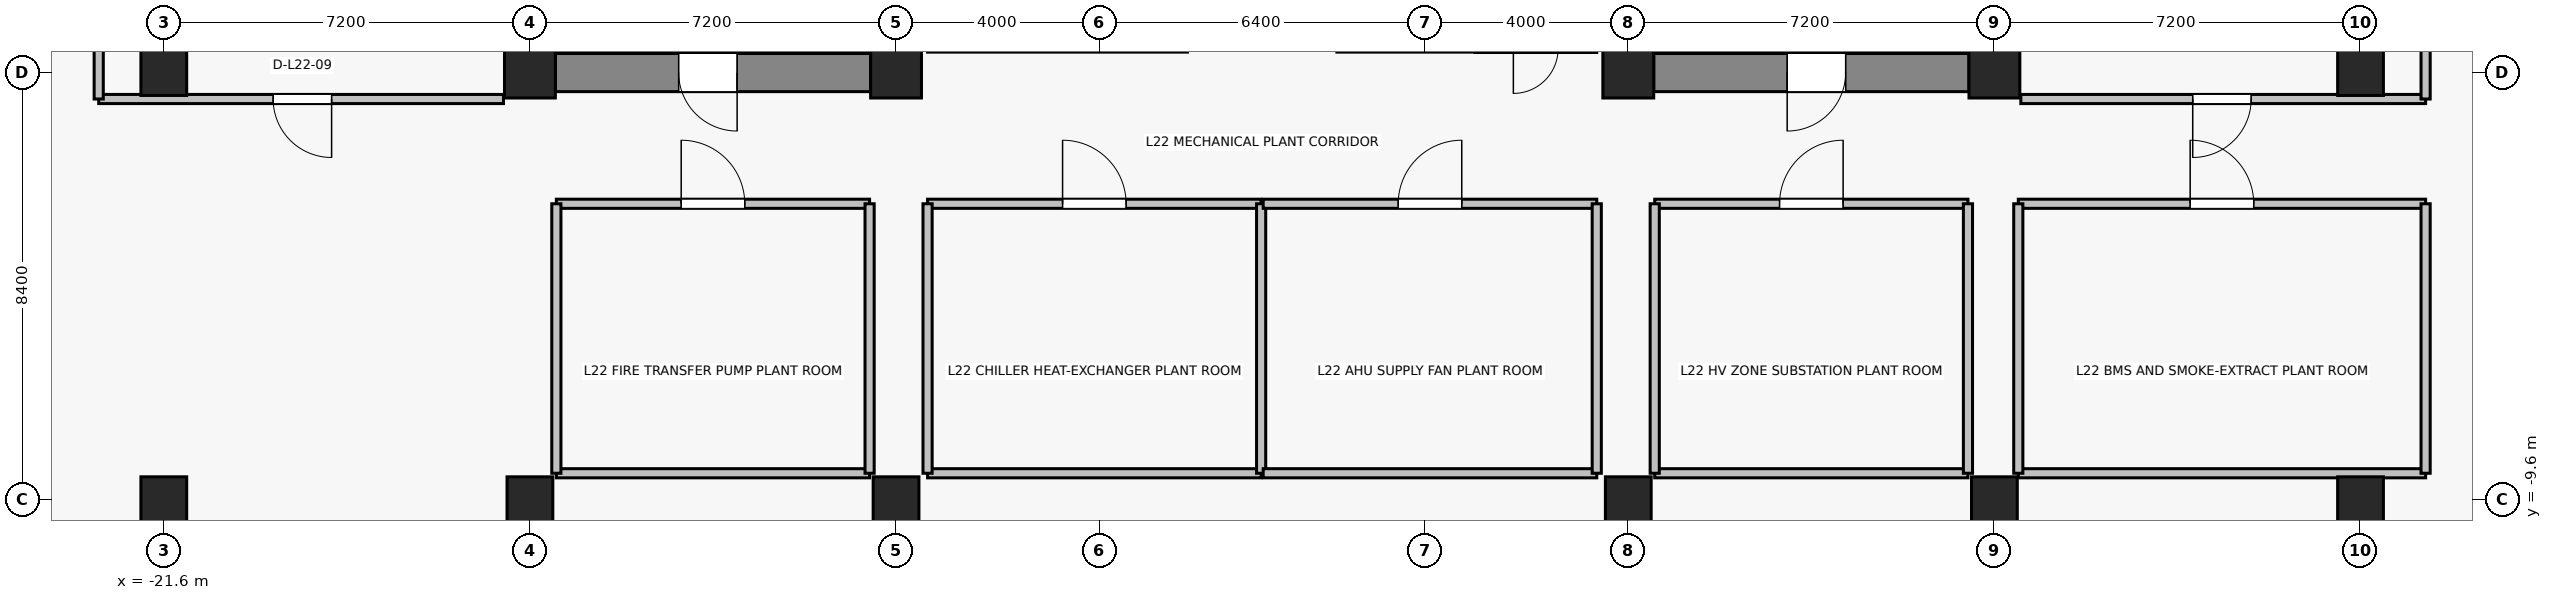
"""IFC4 building model, lengths in metres.
Left out: names, types, materials, properties, quantities, classifications, styles, units other than length and angle.
Written with IfcOpenShell. Run it as: python <this file> out.ifc"""

import sys

from ifc_helpers import new_model, si_unit, direction, frame, frame_2d, origin, origin_2d, place, context, subcontext, project, spatial, rectangle, extrude, source, transform, mapped, element, fill, save


model = new_model("IFC4")
c1 = context("Model", 3, precision=1e-05, world=origin(), true_north=direction((0.0, 1.0)))
c2 = subcontext(c1, "Body", "Model", "MODEL_VIEW")
j1 = project(units=[si_unit("LENGTHUNIT", "METRE"), si_unit("PLANEANGLEUNIT", "RADIAN")], contexts=[c1])
p1 = place(None, origin())
s1 = spatial("IfcSite", under=j1, at=p1, CompositionType="ELEMENT")
p2 = place(p1, origin())
s2 = spatial("IfcBuilding", under=s1, at=p2, CompositionType="ELEMENT")
p3 = place(p2, frame((0.0, 0.0, 80.2)))
s3 = spatial("IfcBuildingStorey", under=s2, at=p3, CompositionType="ELEMENT", Elevation=80.2)
for number, where, z_axis, x_axis in (
    (1, (-14.4, -1.2, 0.0), (0.0, 0.0, 1.0), (1.0, 0.0, 0.0)),
    (2, (-7.2, -1.2, 0.0), (0.0, 0.0, 1.0), (1.0, 0.0, 0.0)),
    (3, (7.2, -1.2, 0.0), (0.0, 0.0, 1.0), (1.0, 0.0, 0.0)),
    (4, (14.4, -1.2, 0.0), (0.0, 0.0, 1.0), (1.0, 0.0, 0.0)),
):
    element("IfcColumn", number, at=place(p3, frame(where, z_axis=z_axis, x_axis=x_axis)), inside=s3, PredefinedType="COLUMN", context=c2, shape_type="SweptSolid", body=[
        extrude(rectangle(XDim=1.0, YDim=1.0, at=origin_2d()), origin(), (0.0, 0.0, 1.0), 6.6),
    ])
for number, where, z_axis, x_axis in (
    (5, (-14.4, -9.6, 0.0), (0.0, 0.0, 1.0), (1.0, 0.0, 0.0)),
    (6, (-7.2, -9.6, 0.0), (0.0, 0.0, 1.0), (1.0, 0.0, 0.0)),
    (7, (7.2, -9.6, 0.0), (0.0, 0.0, 1.0), (1.0, 0.0, 0.0)),
    (8, (14.4, -9.6, 0.0), (0.0, 0.0, 1.0), (1.0, 0.0, 0.0)),
    (9, (-21.6, -9.6, 0.0), (0.0, 0.0, 1.0), (1.0, 0.0, 0.0)),
    (10, (-21.6, -1.2, 0.0), (0.0, 0.0, 1.0), (1.0, 0.0, 0.0)),
    (11, (21.6, -9.6, 0.0), (0.0, 0.0, 1.0), (1.0, 0.0, 0.0)),
    (12, (21.6, -1.2, 0.0), (0.0, 0.0, 1.0), (1.0, 0.0, 0.0)),
):
    element("IfcColumn", number, at=place(p3, frame(where, z_axis=z_axis, x_axis=x_axis)), inside=s3, PredefinedType="COLUMN", context=c2, shape_type="SweptSolid", body=[
        extrude(rectangle(XDim=0.9, YDim=0.9, at=origin_2d()), origin(), (0.0, 0.0, 1.0), 6.6),
    ])
p4 = place(p3, frame((-7.7, -1.2, 0.0), z_axis=(0.0, 0.0, 1.0), x_axis=(-1.0, 0.0, 0.0)))
e13 = element("IfcWall", 13, at=p4, inside=s3, PredefinedType="SHEAR", context=c2, shape_type="SweptSolid", body=[
    extrude(rectangle(XDim=6.2, YDim=0.75, at=frame_2d((3.1, 0.0))), origin(), (0.0, 0.0, 1.0), 6.35),
])
p5 = place(p4, frame((2.625, 0.0, 0.0)))
e14 = element("IfcOpeningElement", 14, at=p5, cuts=e13, PredefinedType="OPENING", context=c2, shape_type="SweptSolid", body=[
    extrude(rectangle(XDim=1.15, YDim=2.15, at=frame_2d((0.575, 1.075))), frame((0.0, 0.385, 0.0), z_axis=(0.0, -1.0, 0.0), x_axis=(1.0, 0.0, 0.0)), (0.0, 0.0, 1.0), 0.77),
])
p6 = place(p3, frame((13.9, -1.2, 0.0), z_axis=(0.0, 0.0, 1.0), x_axis=(-1.0, 0.0, 0.0)))
e15 = element("IfcWall", 15, at=p6, inside=s3, PredefinedType="SHEAR", context=c2, shape_type="SweptSolid", body=[
    extrude(rectangle(XDim=6.2, YDim=0.75, at=frame_2d((3.1, 0.0))), origin(), (0.0, 0.0, 1.0), 6.35),
])
p7 = place(p6, frame((2.425, 0.0, 0.0)))
e16 = element("IfcOpeningElement", 16, at=p7, cuts=e15, PredefinedType="OPENING", context=c2, shape_type="SweptSolid", body=[
    extrude(rectangle(XDim=1.15, YDim=2.15, at=frame_2d((0.575, 1.075))), frame((0.0, 0.385, 0.0), z_axis=(0.0, -1.0, 0.0), x_axis=(1.0, 0.0, 0.0)), (0.0, 0.0, 1.0), 0.77),
])
for number, where, z_axis, x_axis in (
    (17, (-7.4, -0.825, 0.0), (0.0, 0.0, 1.0), (0.0, 1.0, 0.0)),
    (18, (7.4, -0.825, 0.0), (0.0, 0.0, 1.0), (0.0, 1.0, 0.0)),
):
    element("IfcWall", number, at=place(p3, frame(where, z_axis=z_axis, x_axis=x_axis)), inside=s3, PredefinedType="SHEAR", context=c2, shape_type="SweptSolid", body=[
        extrude(rectangle(XDim=4.075, YDim=0.55, at=frame_2d((2.038, 0.0))), origin(), (0.0, 0.0, 1.0), 6.35),
    ])
p8 = place(p3, frame((6.58, -0.73, 0.0), z_axis=(0.0, 0.0, 1.0), x_axis=(-1.0, 0.0, 0.0)))
e19 = element("IfcWall", 19, at=p8, inside=s3, PredefinedType="PARTITIONING", context=c2, shape_type="SweptSolid", body=[
    extrude(rectangle(XDim=2.4, YDim=0.15, at=frame_2d((1.2, 0.0))), origin(), (0.0, 0.0, 1.0), 6.35),
])
p9 = place(p8, frame((0.76, 0.0, 0.0)))
e20 = element("IfcOpeningElement", 20, at=p9, cuts=e19, PredefinedType="OPENING", context=c2, shape_type="SweptSolid", body=[
    extrude(rectangle(XDim=0.88, YDim=2.1, at=frame_2d((0.44, 1.05))), frame((0.0, 0.085, 0.0), z_axis=(0.0, -1.0, 0.0), x_axis=(1.0, 0.0, 0.0)), (0.0, 0.0, 1.0), 0.17),
])
p10 = place(p3, frame((-14.92, -1.72, 0.0), z_axis=(0.0, 0.0, 1.0), x_axis=(-1.0, 0.0, 0.0)))
e21 = element("IfcWall", 21, at=p10, inside=s3, PredefinedType="PARTITIONING", context=c2, shape_type="SweptSolid", body=[
    extrude(rectangle(XDim=7.96, YDim=0.18, at=frame_2d((3.98, 0.0))), origin(), (0.0, 0.0, 1.0), 5.79),
])
p11 = place(p10, frame((3.38, 0.0, 0.0)))
e22 = element("IfcOpeningElement", 22, at=p11, cuts=e21, PredefinedType="OPENING", context=c2, shape_type="SweptSolid", body=[
    extrude(rectangle(XDim=1.15, YDim=2.15, at=frame_2d((0.575, 1.075))), frame((0.0, 0.1, 0.0), z_axis=(0.0, -1.0, 0.0), x_axis=(1.0, 0.0, 0.0)), (0.0, 0.0, 1.0), 0.2),
])
p12 = place(p3, frame((-22.88, -1.72, 0.0), z_axis=(0.0, 0.0, 1.0), x_axis=(0.0, 1.0, 0.0)))
e23 = element("IfcWall", 23, at=p12, inside=s3, PredefinedType="PARTITIONING", context=c2, shape_type="SweptSolid", body=[
    extrude(rectangle(XDim=7.0, YDim=0.18, at=frame_2d((3.5, 0.0))), origin(), (0.0, 0.0, 1.0), 5.332),
])
p13 = place(p3, frame((22.88, -1.72, 0.0), z_axis=(0.0, 0.0, 1.0), x_axis=(-1.0, 0.0, 0.0)))
e24 = element("IfcWall", 24, at=p13, inside=s3, PredefinedType="PARTITIONING", context=c2, shape_type="SweptSolid", body=[
    extrude(rectangle(XDim=7.96, YDim=0.18, at=frame_2d((3.98, 0.0))), origin(), (0.0, 0.0, 1.0), 5.79),
])
p14 = place(p13, frame((3.43, 0.0, 0.0)))
e25 = element("IfcOpeningElement", 25, at=p14, cuts=e24, PredefinedType="OPENING", context=c2, shape_type="SweptSolid", body=[
    extrude(rectangle(XDim=1.15, YDim=2.15, at=frame_2d((0.575, 1.075))), frame((0.0, 0.1, 0.0), z_axis=(0.0, -1.0, 0.0), x_axis=(1.0, 0.0, 0.0)), (0.0, 0.0, 1.0), 0.2),
])
p15 = place(p3, frame((22.88, 5.28, 0.0), z_axis=(0.0, 0.0, 1.0), x_axis=(0.0, -1.0, 0.0)))
e26 = element("IfcWall", 26, at=p15, inside=s3, PredefinedType="PARTITIONING", context=c2, shape_type="SweptSolid", body=[
    extrude(rectangle(XDim=7.0, YDim=0.18, at=frame_2d((3.5, 0.0))), origin(), (0.0, 0.0, 1.0), 4.89),
])
p16 = place(p3, frame((-0.02, -9.08, 0.0), z_axis=(0.0, 0.0, 1.0), x_axis=(-1.0, 0.0, 0.0)))
e27 = element("IfcWall", 27, at=p16, inside=s3, PredefinedType="PARTITIONING", context=c2, shape_type="SweptSolid", body=[
    extrude(rectangle(XDim=6.56, YDim=0.18, at=frame_2d((3.28, 0.0))), origin(), (0.0, 0.0, 1.0), 6.35),
])
p17 = place(p3, frame((-6.58, -3.78, 0.0), z_axis=(0.0, 0.0, 1.0), x_axis=(1.0, 0.0, 0.0)))
e28 = element("IfcWall", 28, at=p17, inside=s3, PredefinedType="PARTITIONING", context=c2, shape_type="SweptSolid", body=[
    extrude(rectangle(XDim=6.56, YDim=0.18, at=frame_2d((3.28, 0.0))), origin(), (0.0, 0.0, 1.0), 6.35),
])
p18 = place(p17, frame((2.655, 0.0, 0.0)))
e29 = element("IfcOpeningElement", 29, at=p18, cuts=e28, PredefinedType="OPENING", context=c2, shape_type="SweptSolid", body=[
    extrude(rectangle(XDim=1.25, YDim=2.15, at=frame_2d((0.625, 1.075))), frame((0.0, 0.1, 0.0), z_axis=(0.0, -1.0, 0.0), x_axis=(1.0, 0.0, 0.0)), (0.0, 0.0, 1.0), 0.2),
])
for number, where, z_axis, x_axis in (
    (30, (-6.58, -9.08, 0.0), (0.0, 0.0, 1.0), (0.0, 1.0, 0.0)),
    (31, (-0.02, -3.78, 0.0), (0.0, 0.0, 1.0), (0.0, -1.0, 0.0)),
):
    element("IfcWall", number, at=place(p3, frame(where, z_axis=z_axis, x_axis=x_axis)), inside=s3, PredefinedType="PARTITIONING", context=c2, shape_type="SweptSolid", body=[
        extrude(rectangle(XDim=5.3, YDim=0.18, at=frame_2d((2.65, 0.0))), origin(), (0.0, 0.0, 1.0), 6.35),
    ])
p19 = place(p3, frame((6.58, -9.08, 0.0), z_axis=(0.0, 0.0, 1.0), x_axis=(-1.0, 0.0, 0.0)))
e32 = element("IfcWall", 32, at=p19, inside=s3, PredefinedType="PARTITIONING", context=c2, shape_type="SweptSolid", body=[
    extrude(rectangle(XDim=6.56, YDim=0.18, at=frame_2d((3.28, 0.0))), origin(), (0.0, 0.0, 1.0), 6.35),
])
p20 = place(p3, frame((0.02, -3.78, 0.0), z_axis=(0.0, 0.0, 1.0), x_axis=(1.0, 0.0, 0.0)))
e33 = element("IfcWall", 33, at=p20, inside=s3, PredefinedType="PARTITIONING", context=c2, shape_type="SweptSolid", body=[
    extrude(rectangle(XDim=6.56, YDim=0.18, at=frame_2d((3.28, 0.0))), origin(), (0.0, 0.0, 1.0), 6.35),
])
p21 = place(p20, frame((2.655, 0.0, 0.0)))
e34 = element("IfcOpeningElement", 34, at=p21, cuts=e33, PredefinedType="OPENING", context=c2, shape_type="SweptSolid", body=[
    extrude(rectangle(XDim=1.25, YDim=2.15, at=frame_2d((0.625, 1.075))), frame((0.0, 0.1, 0.0), z_axis=(0.0, -1.0, 0.0), x_axis=(1.0, 0.0, 0.0)), (0.0, 0.0, 1.0), 0.2),
])
p22 = place(p3, frame((6.58, -3.78, 0.0), z_axis=(0.0, 0.0, 1.0), x_axis=(0.0, -1.0, 0.0)))
e35 = element("IfcWall", 35, at=p22, inside=s3, PredefinedType="PARTITIONING", context=c2, shape_type="SweptSolid", body=[
    extrude(rectangle(XDim=5.3, YDim=0.18, at=frame_2d((2.65, 0.0))), origin(), (0.0, 0.0, 1.0), 6.35),
])
p23 = place(p3, frame((-7.72, -9.08, 0.0), z_axis=(0.0, 0.0, 1.0), x_axis=(-1.0, 0.0, 0.0)))
e36 = element("IfcWall", 36, at=p23, inside=s3, PredefinedType="PARTITIONING", context=c2, shape_type="SweptSolid", body=[
    extrude(rectangle(XDim=6.16, YDim=0.18, at=frame_2d((3.08, 0.0))), origin(), (0.0, 0.0, 1.0), 6.35),
])
p24 = place(p3, frame((-13.88, -3.78, 0.0), z_axis=(0.0, 0.0, 1.0), x_axis=(1.0, 0.0, 0.0)))
e37 = element("IfcWall", 37, at=p24, inside=s3, PredefinedType="PARTITIONING", context=c2, shape_type="SweptSolid", body=[
    extrude(rectangle(XDim=6.16, YDim=0.18, at=frame_2d((3.08, 0.0))), origin(), (0.0, 0.0, 1.0), 6.35),
])
p25 = place(p24, frame((2.455, 0.0, 0.0)))
e38 = element("IfcOpeningElement", 38, at=p25, cuts=e37, PredefinedType="OPENING", context=c2, shape_type="SweptSolid", body=[
    extrude(rectangle(XDim=1.25, YDim=2.15, at=frame_2d((0.625, 1.075))), frame((0.0, 0.1, 0.0), z_axis=(0.0, -1.0, 0.0), x_axis=(1.0, 0.0, 0.0)), (0.0, 0.0, 1.0), 0.2),
])
for number, where, z_axis, x_axis in (
    (39, (-13.88, -9.08, 0.0), (0.0, 0.0, 1.0), (0.0, 1.0, 0.0)),
    (40, (-7.72, -3.78, 0.0), (0.0, 0.0, 1.0), (0.0, -1.0, 0.0)),
):
    element("IfcWall", number, at=place(p3, frame(where, z_axis=z_axis, x_axis=x_axis)), inside=s3, PredefinedType="PARTITIONING", context=c2, shape_type="SweptSolid", body=[
        extrude(rectangle(XDim=5.3, YDim=0.18, at=frame_2d((2.65, 0.0))), origin(), (0.0, 0.0, 1.0), 5.89),
    ])
p26 = place(p3, frame((13.88, -9.08, 0.0), z_axis=(0.0, 0.0, 1.0), x_axis=(-1.0, 0.0, 0.0)))
e41 = element("IfcWall", 41, at=p26, inside=s3, PredefinedType="PARTITIONING", context=c2, shape_type="SweptSolid", body=[
    extrude(rectangle(XDim=6.16, YDim=0.18, at=frame_2d((3.08, 0.0))), origin(), (0.0, 0.0, 1.0), 6.35),
])
p27 = place(p3, frame((7.72, -3.78, 0.0), z_axis=(0.0, 0.0, 1.0), x_axis=(1.0, 0.0, 0.0)))
e42 = element("IfcWall", 42, at=p27, inside=s3, PredefinedType="PARTITIONING", context=c2, shape_type="SweptSolid", body=[
    extrude(rectangle(XDim=6.16, YDim=0.18, at=frame_2d((3.08, 0.0))), origin(), (0.0, 0.0, 1.0), 6.35),
])
p28 = place(p27, frame((2.455, 0.0, 0.0)))
e43 = element("IfcOpeningElement", 43, at=p28, cuts=e42, PredefinedType="OPENING", context=c2, shape_type="SweptSolid", body=[
    extrude(rectangle(XDim=1.25, YDim=2.15, at=frame_2d((0.625, 1.075))), frame((0.0, 0.1, 0.0), z_axis=(0.0, -1.0, 0.0), x_axis=(1.0, 0.0, 0.0)), (0.0, 0.0, 1.0), 0.2),
])
for number, where, z_axis, x_axis in (
    (44, (7.72, -9.08, 0.0), (0.0, 0.0, 1.0), (0.0, 1.0, 0.0)),
    (45, (13.88, -3.78, 0.0), (0.0, 0.0, 1.0), (0.0, -1.0, 0.0)),
):
    element("IfcWall", number, at=place(p3, frame(where, z_axis=z_axis, x_axis=x_axis)), inside=s3, PredefinedType="PARTITIONING", context=c2, shape_type="SweptSolid", body=[
        extrude(rectangle(XDim=5.3, YDim=0.18, at=frame_2d((2.65, 0.0))), origin(), (0.0, 0.0, 1.0), 5.89),
    ])
p29 = place(p3, frame((22.88, -9.08, 0.0), z_axis=(0.0, 0.0, 1.0), x_axis=(-1.0, 0.0, 0.0)))
e46 = element("IfcWall", 46, at=p29, inside=s3, PredefinedType="PARTITIONING", context=c2, shape_type="SweptSolid", body=[
    extrude(rectangle(XDim=8.01, YDim=0.18, at=frame_2d((4.005, 0.0))), origin(), (0.0, 0.0, 1.0), 5.79),
])
p30 = place(p3, frame((14.87, -3.78, 0.0), z_axis=(0.0, 0.0, 1.0), x_axis=(1.0, 0.0, 0.0)))
e47 = element("IfcWall", 47, at=p30, inside=s3, PredefinedType="PARTITIONING", context=c2, shape_type="SweptSolid", body=[
    extrude(rectangle(XDim=8.01, YDim=0.18, at=frame_2d((4.005, 0.0))), origin(), (0.0, 0.0, 1.0), 5.79),
])
p31 = place(p30, frame((3.38, 0.0, 0.0)))
e48 = element("IfcOpeningElement", 48, at=p31, cuts=e47, PredefinedType="OPENING", context=c2, shape_type="SweptSolid", body=[
    extrude(rectangle(XDim=1.25, YDim=2.15, at=frame_2d((0.625, 1.075))), frame((0.0, 0.1, 0.0), z_axis=(0.0, -1.0, 0.0), x_axis=(1.0, 0.0, 0.0)), (0.0, 0.0, 1.0), 0.2),
])
for number, where, z_axis, x_axis in (
    (49, (14.87, -9.08, 0.0), (0.0, 0.0, 1.0), (0.0, 1.0, 0.0)),
    (50, (22.88, -3.78, 0.0), (0.0, 0.0, 1.0), (0.0, -1.0, 0.0)),
):
    element("IfcWall", number, at=place(p3, frame(where, z_axis=z_axis, x_axis=x_axis)), inside=s3, PredefinedType="PARTITIONING", context=c2, shape_type="SweptSolid", body=[
        extrude(rectangle(XDim=5.3, YDim=0.18, at=frame_2d((2.65, 0.0))), origin(), (0.0, 0.0, 1.0), 5.89),
    ])
m1 = source(origin(), c2, "Body", "SweptSolid", [
    extrude(rectangle(XDim=1.15, YDim=2.15, at=frame_2d((0.575, 1.075))), frame((0.0, 0.025, 0.0), z_axis=(0.0, -1.0, 0.0), x_axis=(1.0, 0.0, 0.0)), (0.0, 0.0, 1.0), 0.05),
])
p32 = place(p5, origin())
e51 = element("IfcDoor", 51, at=p32, inside=s3, OperationType="SINGLE_SWING_LEFT", PredefinedType="DOOR", context=c2, shape_type="MappedRepresentation", body=[
    mapped(m1, transform((0.0, 0.0, 0.0), x_axis=(1.0, 0.0, 0.0), y_axis=(0.0, 1.0, 0.0), z_axis=(0.0, 0.0, 1.0), scale=1.0)),
])
fill(e14, e51)
p33 = place(p7, origin())
e52 = element("IfcDoor", 52, at=p33, inside=s3, OperationType="SINGLE_SWING_RIGHT", PredefinedType="DOOR", context=c2, shape_type="MappedRepresentation", body=[
    mapped(m1, transform((0.0, 0.0, 0.0), x_axis=(1.0, 0.0, 0.0), y_axis=(0.0, 1.0, 0.0), z_axis=(0.0, 0.0, 1.0), scale=1.0)),
])
fill(e16, e52)
p34 = place(p11, origin())
e53 = element("IfcDoor", 53, at=p34, inside=s3, OperationType="SINGLE_SWING_LEFT", PredefinedType="DOOR", context=c2, shape_type="MappedRepresentation", body=[
    mapped(m1, transform((0.0, 0.0, 0.0), x_axis=(1.0, 0.0, 0.0), y_axis=(0.0, 1.0, 0.0), z_axis=(0.0, 0.0, 1.0), scale=1.0)),
])
fill(e22, e53)
p35 = place(p14, origin())
e54 = element("IfcDoor", 54, at=p35, inside=s3, OperationType="SINGLE_SWING_RIGHT", PredefinedType="DOOR", context=c2, shape_type="MappedRepresentation", body=[
    mapped(m1, transform((0.0, 0.0, 0.0), x_axis=(1.0, 0.0, 0.0), y_axis=(0.0, 1.0, 0.0), z_axis=(0.0, 0.0, 1.0), scale=1.0)),
])
fill(e25, e54)
m2 = source(origin(), c2, "Body", "SweptSolid", [
    extrude(rectangle(XDim=1.25, YDim=2.15, at=frame_2d((0.625, 1.075))), frame((0.0, 0.025, 0.0), z_axis=(0.0, -1.0, 0.0), x_axis=(1.0, 0.0, 0.0)), (0.0, 0.0, 1.0), 0.05),
])
p36 = place(p18, origin())
e55 = element("IfcDoor", 55, at=p36, inside=s3, OperationType="SINGLE_SWING_LEFT", PredefinedType="DOOR", context=c2, shape_type="MappedRepresentation", body=[
    mapped(m2, transform((0.0, 0.0, 0.0), x_axis=(1.0, 0.0, 0.0), y_axis=(0.0, 1.0, 0.0), z_axis=(0.0, 0.0, 1.0), scale=1.0)),
])
fill(e29, e55)
p37 = place(p21, origin())
e56 = element("IfcDoor", 56, at=p37, inside=s3, OperationType="SINGLE_SWING_RIGHT", PredefinedType="DOOR", context=c2, shape_type="MappedRepresentation", body=[
    mapped(m2, transform((0.0, 0.0, 0.0), x_axis=(1.0, 0.0, 0.0), y_axis=(0.0, 1.0, 0.0), z_axis=(0.0, 0.0, 1.0), scale=1.0)),
])
fill(e34, e56)
p38 = place(p25, origin())
e57 = element("IfcDoor", 57, at=p38, inside=s3, OperationType="SINGLE_SWING_LEFT", PredefinedType="DOOR", context=c2, shape_type="MappedRepresentation", body=[
    mapped(m2, transform((0.0, 0.0, 0.0), x_axis=(1.0, 0.0, 0.0), y_axis=(0.0, 1.0, 0.0), z_axis=(0.0, 0.0, 1.0), scale=1.0)),
])
fill(e38, e57)
p39 = place(p28, origin())
e58 = element("IfcDoor", 58, at=p39, inside=s3, OperationType="SINGLE_SWING_RIGHT", PredefinedType="DOOR", context=c2, shape_type="MappedRepresentation", body=[
    mapped(m2, transform((0.0, 0.0, 0.0), x_axis=(1.0, 0.0, 0.0), y_axis=(0.0, 1.0, 0.0), z_axis=(0.0, 0.0, 1.0), scale=1.0)),
])
fill(e43, e58)
p40 = place(p31, origin())
e59 = element("IfcDoor", 59, at=p40, inside=s3, OperationType="SINGLE_SWING_LEFT", PredefinedType="DOOR", context=c2, shape_type="MappedRepresentation", body=[
    mapped(m2, transform((0.0, 0.0, 0.0), x_axis=(1.0, 0.0, 0.0), y_axis=(0.0, 1.0, 0.0), z_axis=(0.0, 0.0, 1.0), scale=1.0)),
])
fill(e48, e59)
save(model, sys.argv[1])
